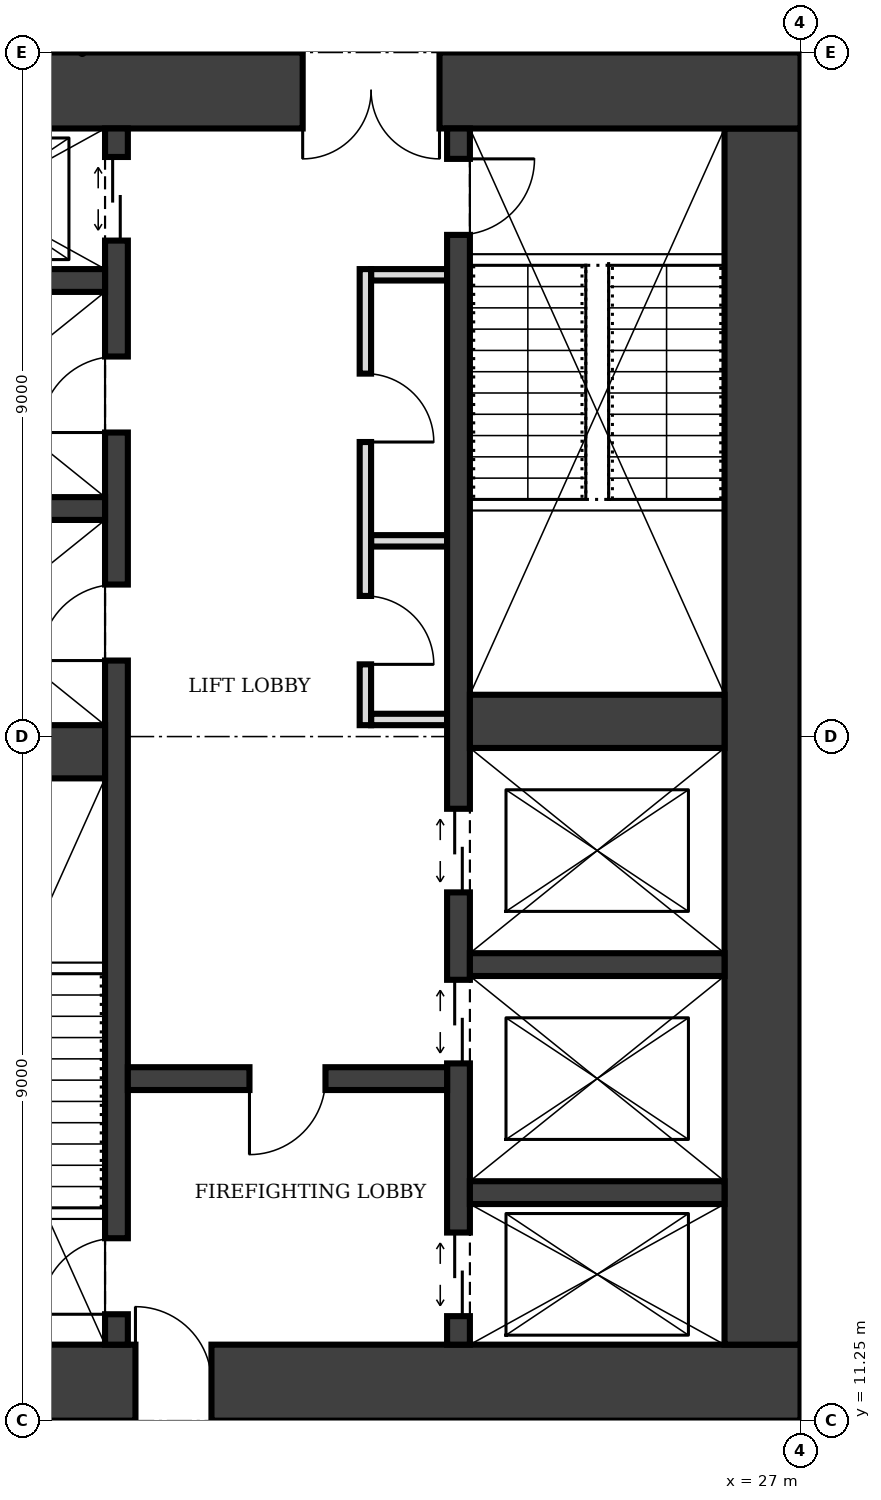
"""IFC4 building model, lengths in metres.
Left out: names, types, materials, properties, quantities, classifications, styles, units other than length and angle.
Written with IfcOpenShell. Run it as: python <this file> out.ifc"""

import sys

from ifc_helpers import new_model, si_unit, direction, frame, frame_2d, origin, place, context, subcontext, project, spatial, rectangle, extrude, element, fill, save


model = new_model("IFC4")
c1 = context("Model", 3, precision=1e-05, world=origin(), true_north=direction((0.0, 1.0)))
c2 = subcontext(c1, "Body", "Model", "MODEL_VIEW")
j1 = project(units=[si_unit("LENGTHUNIT", "METRE"), si_unit("PLANEANGLEUNIT", "RADIAN")], contexts=[c1])
p1 = place(None, origin())
s1 = spatial("IfcSite", under=j1, at=p1, CompositionType="ELEMENT")
p2 = place(p1, origin())
s2 = spatial("IfcBuilding", under=s1, at=p2, CompositionType="ELEMENT")
p3 = place(p2, frame((0.0, 0.0, 201.0)))
s3 = spatial("IfcBuildingStorey", under=s2, at=p3, CompositionType="ELEMENT", Elevation=201.0)
p4 = place(p3, frame((13.5, 11.75, 0.0), z_axis=(0.0, 0.0, 1.0), x_axis=(1.0, 0.0, 0.0)))
e1 = element("IfcWall", 1, at=p4, inside=s3, PredefinedType="SHEAR", context=c2, shape_type="SweptSolid", body=[
    extrude(rectangle(XDim=13.5, YDim=1.0, at=frame_2d((6.75, 0.0))), origin(), (0.0, 0.0, 1.0), 4.0),
])
p5 = place(p4, frame((4.75, 0.0, 0.0)))
e2 = element("IfcOpeningElement", 2, at=p5, cuts=e1, PredefinedType="OPENING", context=c2, shape_type="SweptSolid", body=[
    extrude(rectangle(XDim=1.0, YDim=2.1, at=frame_2d((0.5, 1.05))), frame((0.0, 0.51, 0.0), z_axis=(0.0, -1.0, 0.0), x_axis=(1.0, 0.0, 0.0)), (0.0, 0.0, 1.0), 1.02),
])
p6 = place(p3, frame((26.5, 12.25, 0.0), z_axis=(0.0, 0.0, 1.0), x_axis=(0.0, 1.0, 0.0)))
e3 = element("IfcWall", 3, at=p6, inside=s3, PredefinedType="SHEAR", context=c2, shape_type="SweptSolid", body=[
    extrude(rectangle(XDim=16.0, YDim=1.0, at=frame_2d((8.0, 0.0))), origin(), (0.0, 0.0, 1.0), 4.0),
])
p7 = place(p3, frame((27.0, 28.75, 0.0), z_axis=(0.0, 0.0, 1.0), x_axis=(-1.0, 0.0, 0.0)))
e4 = element("IfcWall", 4, at=p7, inside=s3, PredefinedType="SHEAR", context=c2, shape_type="SweptSolid", body=[
    extrude(rectangle(XDim=13.5, YDim=1.0, at=frame_2d((6.75, 0.0))), origin(), (0.0, 0.0, 1.0), 4.0),
])
p8 = place(p7, frame((4.75, 0.0, 0.0)))
e5 = element("IfcOpeningElement", 5, at=p8, cuts=e4, PredefinedType="OPENING", context=c2, shape_type="SweptSolid", body=[
    extrude(rectangle(XDim=1.8, YDim=2.1, at=frame_2d((0.9, 1.05))), frame((0.0, 0.51, 0.0), z_axis=(0.0, -1.0, 0.0), x_axis=(1.0, 0.0, 0.0)), (0.0, 0.0, 1.0), 1.02),
])
p9 = place(p3, frame((18.0, 12.25, 0.0), z_axis=(0.0, 0.0, 1.0), x_axis=(0.0, 1.0, 0.0)))
e6 = element("IfcWall", 6, at=p9, inside=s3, PredefinedType="SHEAR", context=c2, shape_type="SweptSolid", body=[
    extrude(rectangle(XDim=16.0, YDim=0.3, at=frame_2d((8.0, 0.0))), origin(), (0.0, 0.0, 1.0), 4.0),
])
p10 = place(p9, frame((0.4, 0.0, 0.0)))
e7 = element("IfcOpeningElement", 7, at=p10, cuts=e6, PredefinedType="OPENING", context=c2, shape_type="SweptSolid", body=[
    extrude(rectangle(XDim=1.0, YDim=2.1, at=frame_2d((0.5, 1.05))), frame((0.0, 0.16, 0.0), z_axis=(0.0, -1.0, 0.0), x_axis=(1.0, 0.0, 0.0)), (0.0, 0.0, 1.0), 0.32),
])
p11 = place(p9, frame((14.525, 0.0, 0.0)))
e8 = element("IfcOpeningElement", 8, at=p11, cuts=e6, PredefinedType="OPENING", context=c2, shape_type="SweptSolid", body=[
    extrude(rectangle(XDim=1.1, YDim=2.1, at=frame_2d((0.55, 1.05))), frame((0.0, 0.16, 0.0), z_axis=(0.0, -1.0, 0.0), x_axis=(1.0, 0.0, 0.0)), (0.0, 0.0, 1.0), 0.32),
])
p12 = place(p9, frame((9.0, 0.0, 0.0)))
e9 = element("IfcOpeningElement", 9, at=p12, cuts=e6, PredefinedType="OPENING", context=c2, shape_type="SweptSolid", body=[
    extrude(rectangle(XDim=1.0, YDim=2.1, at=frame_2d((0.5, 1.05))), frame((0.0, 0.16, 0.0), z_axis=(0.0, -1.0, 0.0), x_axis=(1.0, 0.0, 0.0)), (0.0, 0.0, 1.0), 0.32),
])
p13 = place(p9, frame((12.0, 0.0, 0.0)))
e10 = element("IfcOpeningElement", 10, at=p13, cuts=e6, PredefinedType="OPENING", context=c2, shape_type="SweptSolid", body=[
    extrude(rectangle(XDim=1.0, YDim=2.1, at=frame_2d((0.5, 1.05))), frame((0.0, 0.16, 0.0), z_axis=(0.0, -1.0, 0.0), x_axis=(1.0, 0.0, 0.0)), (0.0, 0.0, 1.0), 0.32),
])
p14 = place(p3, frame((22.5, 12.25, 0.0), z_axis=(0.0, 0.0, 1.0), x_axis=(0.0, 1.0, 0.0)))
e11 = element("IfcWall", 11, at=p14, inside=s3, PredefinedType="SHEAR", context=c2, shape_type="SweptSolid", body=[
    extrude(rectangle(XDim=16.0, YDim=0.3, at=frame_2d((8.0, 0.0))), origin(), (0.0, 0.0, 1.0), 4.0),
])
p15 = place(p14, frame((14.6, 0.0, 0.0)))
e12 = element("IfcOpeningElement", 12, at=p15, cuts=e11, PredefinedType="OPENING", context=c2, shape_type="SweptSolid", body=[
    extrude(rectangle(XDim=1.0, YDim=2.1, at=frame_2d((0.5, 1.05))), frame((0.0, 0.16, 0.0), z_axis=(0.0, -1.0, 0.0), x_axis=(1.0, 0.0, 0.0)), (0.0, 0.0, 1.0), 0.32),
])
p16 = place(p14, frame((0.375, 0.0, 0.0)))
e13 = element("IfcOpeningElement", 13, at=p16, cuts=e11, PredefinedType="OPENING", context=c2, shape_type="SweptSolid", body=[
    extrude(rectangle(XDim=1.1, YDim=2.1, at=frame_2d((0.55, 1.05))), frame((0.0, 0.16, 0.0), z_axis=(0.0, -1.0, 0.0), x_axis=(1.0, 0.0, 0.0)), (0.0, 0.0, 1.0), 0.32),
])
p17 = place(p14, frame((3.7, 0.0, 0.0)))
e14 = element("IfcOpeningElement", 14, at=p17, cuts=e11, PredefinedType="OPENING", context=c2, shape_type="SweptSolid", body=[
    extrude(rectangle(XDim=1.1, YDim=2.1, at=frame_2d((0.55, 1.05))), frame((0.0, 0.16, 0.0), z_axis=(0.0, -1.0, 0.0), x_axis=(1.0, 0.0, 0.0)), (0.0, 0.0, 1.0), 0.32),
])
p18 = place(p14, frame((5.95, 0.0, 0.0)))
e15 = element("IfcOpeningElement", 15, at=p18, cuts=e11, PredefinedType="OPENING", context=c2, shape_type="SweptSolid", body=[
    extrude(rectangle(XDim=1.1, YDim=2.1, at=frame_2d((0.55, 1.05))), frame((0.0, 0.16, 0.0), z_axis=(0.0, -1.0, 0.0), x_axis=(1.0, 0.0, 0.0)), (0.0, 0.0, 1.0), 0.32),
])
p19 = place(p3, frame((14.5, 20.05, 0.0), z_axis=(0.0, 0.0, 1.0), x_axis=(1.0, 0.0, 0.0)))
e16 = element("IfcWall", 16, at=p19, inside=s3, PredefinedType="SHEAR", context=c2, shape_type="SweptSolid", body=[
    extrude(rectangle(XDim=3.35, YDim=0.7, at=frame_2d((1.675, 0.0))), origin(), (0.0, 0.0, 1.0), 4.0),
])
p20 = place(p3, frame((18.15, 15.75, 0.0), z_axis=(0.0, 0.0, 1.0), x_axis=(1.0, 0.0, 0.0)))
e17 = element("IfcWall", 17, at=p20, inside=s3, PredefinedType="SHEAR", context=c2, shape_type="SweptSolid", body=[
    extrude(rectangle(XDim=4.2, YDim=0.3, at=frame_2d((2.1, 0.0))), origin(), (0.0, 0.0, 1.0), 4.0),
])
p21 = place(p20, frame((1.6, 0.0, 0.0)))
e18 = element("IfcOpeningElement", 18, at=p21, cuts=e17, PredefinedType="OPENING", context=c2, shape_type="SweptSolid", body=[
    extrude(rectangle(XDim=1.0, YDim=2.1, at=frame_2d((0.5, 1.05))), frame((0.0, 0.16, 0.0), z_axis=(0.0, -1.0, 0.0), x_axis=(1.0, 0.0, 0.0)), (0.0, 0.0, 1.0), 0.32),
])
for number, where, z_axis, x_axis in (
    (19, (22.65, 14.25, 0.0), (0.0, 0.0, 1.0), (1.0, 0.0, 0.0)),
    (20, (22.65, 17.25, 0.0), (0.0, 0.0, 1.0), (1.0, 0.0, 0.0)),
):
    element("IfcWall", number, at=place(p3, frame(where, z_axis=z_axis, x_axis=x_axis)), inside=s3, PredefinedType="SHEAR", context=c2, shape_type="SweptSolid", body=[
        extrude(rectangle(XDim=3.35, YDim=0.3, at=frame_2d((1.675, 0.0))), origin(), (0.0, 0.0, 1.0), 4.0),
    ])
p22 = place(p3, frame((22.65, 20.45, 0.0), z_axis=(0.0, 0.0, 1.0), x_axis=(1.0, 0.0, 0.0)))
e21 = element("IfcWall", 21, at=p22, inside=s3, PredefinedType="SHEAR", context=c2, shape_type="SweptSolid", body=[
    extrude(rectangle(XDim=3.35, YDim=0.7, at=frame_2d((1.675, 0.0))), origin(), (0.0, 0.0, 1.0), 4.0),
])
for number, where, z_axis, x_axis in (
    (22, (14.5, 23.25, 0.0), (0.0, 0.0, 1.0), (1.0, 0.0, 0.0)),
    (23, (14.5, 26.25, 0.0), (0.0, 0.0, 1.0), (1.0, 0.0, 0.0)),
):
    element("IfcWall", number, at=place(p3, frame(where, z_axis=z_axis, x_axis=x_axis)), inside=s3, PredefinedType="SHEAR", context=c2, shape_type="SweptSolid", body=[
        extrude(rectangle(XDim=3.35, YDim=0.3, at=frame_2d((1.675, 0.0))), origin(), (0.0, 0.0, 1.0), 4.0),
    ])
p23 = place(p3, frame((21.275, 20.4, 0.0), z_axis=(0.0, 0.0, 1.0), x_axis=(0.0, 1.0, 0.0)))
e24 = element("IfcWall", 24, at=p23, inside=s3, PredefinedType="PARTITIONING", context=c2, shape_type="SweptSolid", body=[
    extrude(rectangle(XDim=6.0, YDim=0.15, at=frame_2d((3.0, 0.0))), origin(), (0.0, 0.0, 1.0), 3.75),
])
p24 = place(p23, frame((0.8, 0.0, 0.0)))
e25 = element("IfcOpeningElement", 25, at=p24, cuts=e24, PredefinedType="OPENING", context=c2, shape_type="SweptSolid", body=[
    extrude(rectangle(XDim=0.9, YDim=2.1, at=frame_2d((0.45, 1.05))), frame((0.0, 0.085, 0.0), z_axis=(0.0, -1.0, 0.0), x_axis=(1.0, 0.0, 0.0)), (0.0, 0.0, 1.0), 0.17),
])
p25 = place(p23, frame((3.725, 0.0, 0.0)))
e26 = element("IfcOpeningElement", 26, at=p25, cuts=e24, PredefinedType="OPENING", context=c2, shape_type="SweptSolid", body=[
    extrude(rectangle(XDim=0.9, YDim=2.1, at=frame_2d((0.45, 1.05))), frame((0.0, 0.085, 0.0), z_axis=(0.0, -1.0, 0.0), x_axis=(1.0, 0.0, 0.0)), (0.0, 0.0, 1.0), 0.17),
])
for number, where, z_axis, x_axis in (
    (27, (21.35, 20.475, 0.0), (0.0, 0.0, 1.0), (1.0, 0.0, 0.0)),
    (28, (21.35, 22.825, 0.0), (0.0, 0.0, 1.0), (1.0, 0.0, 0.0)),
    (29, (21.35, 26.325, 0.0), (0.0, 0.0, 1.0), (1.0, 0.0, 0.0)),
):
    element("IfcWall", number, at=place(p3, frame(where, z_axis=z_axis, x_axis=x_axis)), inside=s3, PredefinedType="PARTITIONING", context=c2, shape_type="SweptSolid", body=[
        extrude(rectangle(XDim=1.0, YDim=0.15, at=frame_2d((0.5, 0.0))), origin(), (0.0, 0.0, 1.0), 3.75),
    ])
p26 = place(p5, origin())
e30 = element("IfcDoor", 30, at=p26, inside=s3, OperationType="SINGLE_SWING_LEFT", PredefinedType="DOOR", context=c2, shape_type="SweptSolid", body=[
    extrude(rectangle(XDim=1.0, YDim=2.1, at=frame_2d((0.5, 1.05))), frame((0.0, 0.025, 0.0), z_axis=(0.0, -1.0, 0.0), x_axis=(1.0, 0.0, 0.0)), (0.0, 0.0, 1.0), 0.05),
])
fill(e2, e30)
p27 = place(p8, origin())
e31 = element("IfcDoor", 31, at=p27, inside=s3, OperationType="DOUBLE_DOOR_SINGLE_SWING", PredefinedType="DOOR", context=c2, shape_type="SweptSolid", body=[
    extrude(rectangle(XDim=1.8, YDim=2.1, at=frame_2d((0.9, 1.05))), frame((0.0, 0.025, 0.0), z_axis=(0.0, -1.0, 0.0), x_axis=(1.0, 0.0, 0.0)), (0.0, 0.0, 1.0), 0.05),
])
fill(e5, e31)
p28 = place(p21, frame((1.0, 0.0, 0.0), z_axis=(0.0, 0.0, 1.0), x_axis=(-1.0, 0.0, 0.0)))
e32 = element("IfcDoor", 32, at=p28, inside=s3, OperationType="SINGLE_SWING_RIGHT", PredefinedType="DOOR", context=c2, shape_type="SweptSolid", body=[
    extrude(rectangle(XDim=1.0, YDim=2.1, at=frame_2d((0.5, 1.05))), frame((0.0, 0.025, 0.0), z_axis=(0.0, -1.0, 0.0), x_axis=(1.0, 0.0, 0.0)), (0.0, 0.0, 1.0), 0.05),
])
fill(e18, e32)
p29 = place(p10, origin())
e33 = element("IfcDoor", 33, at=p29, inside=s3, OperationType="SINGLE_SWING_LEFT", PredefinedType="DOOR", context=c2, shape_type="SweptSolid", body=[
    extrude(rectangle(XDim=1.0, YDim=2.1, at=frame_2d((0.5, 1.05))), frame((0.0, 0.025, 0.0), z_axis=(0.0, -1.0, 0.0), x_axis=(1.0, 0.0, 0.0)), (0.0, 0.0, 1.0), 0.05),
])
fill(e7, e33)
p30 = place(p15, frame((1.0, 0.0, 0.0), z_axis=(0.0, 0.0, 1.0), x_axis=(-1.0, 0.0, 0.0)))
e34 = element("IfcDoor", 34, at=p30, inside=s3, OperationType="SINGLE_SWING_LEFT", PredefinedType="DOOR", context=c2, shape_type="SweptSolid", body=[
    extrude(rectangle(XDim=1.0, YDim=2.1, at=frame_2d((0.5, 1.05))), frame((0.0, 0.025, 0.0), z_axis=(0.0, -1.0, 0.0), x_axis=(1.0, 0.0, 0.0)), (0.0, 0.0, 1.0), 0.05),
])
fill(e12, e34)
p31 = place(p16, origin())
e35 = element("IfcDoor", 35, at=p31, inside=s3, OperationType="DOUBLE_DOOR_SLIDING", PredefinedType="DOOR", context=c2, shape_type="SweptSolid", body=[
    extrude(rectangle(XDim=1.1, YDim=2.1, at=frame_2d((0.55, 1.05))), frame((0.0, 0.025, 0.0), z_axis=(0.0, -1.0, 0.0), x_axis=(1.0, 0.0, 0.0)), (0.0, 0.0, 1.0), 0.05),
])
fill(e13, e35)
p32 = place(p11, origin())
e36 = element("IfcDoor", 36, at=p32, inside=s3, OperationType="DOUBLE_DOOR_SLIDING", PredefinedType="DOOR", context=c2, shape_type="SweptSolid", body=[
    extrude(rectangle(XDim=1.1, YDim=2.1, at=frame_2d((0.55, 1.05))), frame((0.0, 0.025, 0.0), z_axis=(0.0, -1.0, 0.0), x_axis=(1.0, 0.0, 0.0)), (0.0, 0.0, 1.0), 0.05),
])
fill(e8, e36)
p33 = place(p17, origin())
e37 = element("IfcDoor", 37, at=p33, inside=s3, OperationType="DOUBLE_DOOR_SLIDING", PredefinedType="DOOR", context=c2, shape_type="SweptSolid", body=[
    extrude(rectangle(XDim=1.1, YDim=2.1, at=frame_2d((0.55, 1.05))), frame((0.0, 0.025, 0.0), z_axis=(0.0, -1.0, 0.0), x_axis=(1.0, 0.0, 0.0)), (0.0, 0.0, 1.0), 0.05),
])
fill(e14, e37)
p34 = place(p18, origin())
e38 = element("IfcDoor", 38, at=p34, inside=s3, OperationType="DOUBLE_DOOR_SLIDING", PredefinedType="DOOR", context=c2, shape_type="SweptSolid", body=[
    extrude(rectangle(XDim=1.1, YDim=2.1, at=frame_2d((0.55, 1.05))), frame((0.0, 0.025, 0.0), z_axis=(0.0, -1.0, 0.0), x_axis=(1.0, 0.0, 0.0)), (0.0, 0.0, 1.0), 0.05),
])
fill(e15, e38)
p35 = place(p24, frame((0.9, 0.0, 0.0), z_axis=(0.0, 0.0, 1.0), x_axis=(-1.0, 0.0, 0.0)))
e39 = element("IfcDoor", 39, at=p35, inside=s3, OperationType="SINGLE_SWING_RIGHT", PredefinedType="DOOR", context=c2, shape_type="SweptSolid", body=[
    extrude(rectangle(XDim=0.9, YDim=2.1, at=frame_2d((0.45, 1.05))), frame((0.0, 0.025, 0.0), z_axis=(0.0, -1.0, 0.0), x_axis=(1.0, 0.0, 0.0)), (0.0, 0.0, 1.0), 0.05),
])
fill(e25, e39)
p36 = place(p25, frame((0.9, 0.0, 0.0), z_axis=(0.0, 0.0, 1.0), x_axis=(-1.0, 0.0, 0.0)))
e40 = element("IfcDoor", 40, at=p36, inside=s3, OperationType="SINGLE_SWING_RIGHT", PredefinedType="DOOR", context=c2, shape_type="SweptSolid", body=[
    extrude(rectangle(XDim=0.9, YDim=2.1, at=frame_2d((0.45, 1.05))), frame((0.0, 0.025, 0.0), z_axis=(0.0, -1.0, 0.0), x_axis=(1.0, 0.0, 0.0)), (0.0, 0.0, 1.0), 0.05),
])
fill(e26, e40)
p37 = place(p12, origin())
e41 = element("IfcDoor", 41, at=p37, inside=s3, OperationType="SINGLE_SWING_LEFT", PredefinedType="DOOR", context=c2, shape_type="SweptSolid", body=[
    extrude(rectangle(XDim=1.0, YDim=2.1, at=frame_2d((0.5, 1.05))), frame((0.0, 0.025, 0.0), z_axis=(0.0, -1.0, 0.0), x_axis=(1.0, 0.0, 0.0)), (0.0, 0.0, 1.0), 0.05),
])
fill(e9, e41)
p38 = place(p13, origin())
e42 = element("IfcDoor", 42, at=p38, inside=s3, OperationType="SINGLE_SWING_LEFT", PredefinedType="DOOR", context=c2, shape_type="SweptSolid", body=[
    extrude(rectangle(XDim=1.0, YDim=2.1, at=frame_2d((0.5, 1.05))), frame((0.0, 0.025, 0.0), z_axis=(0.0, -1.0, 0.0), x_axis=(1.0, 0.0, 0.0)), (0.0, 0.0, 1.0), 0.05),
])
fill(e10, e42)
save(model, sys.argv[1])
